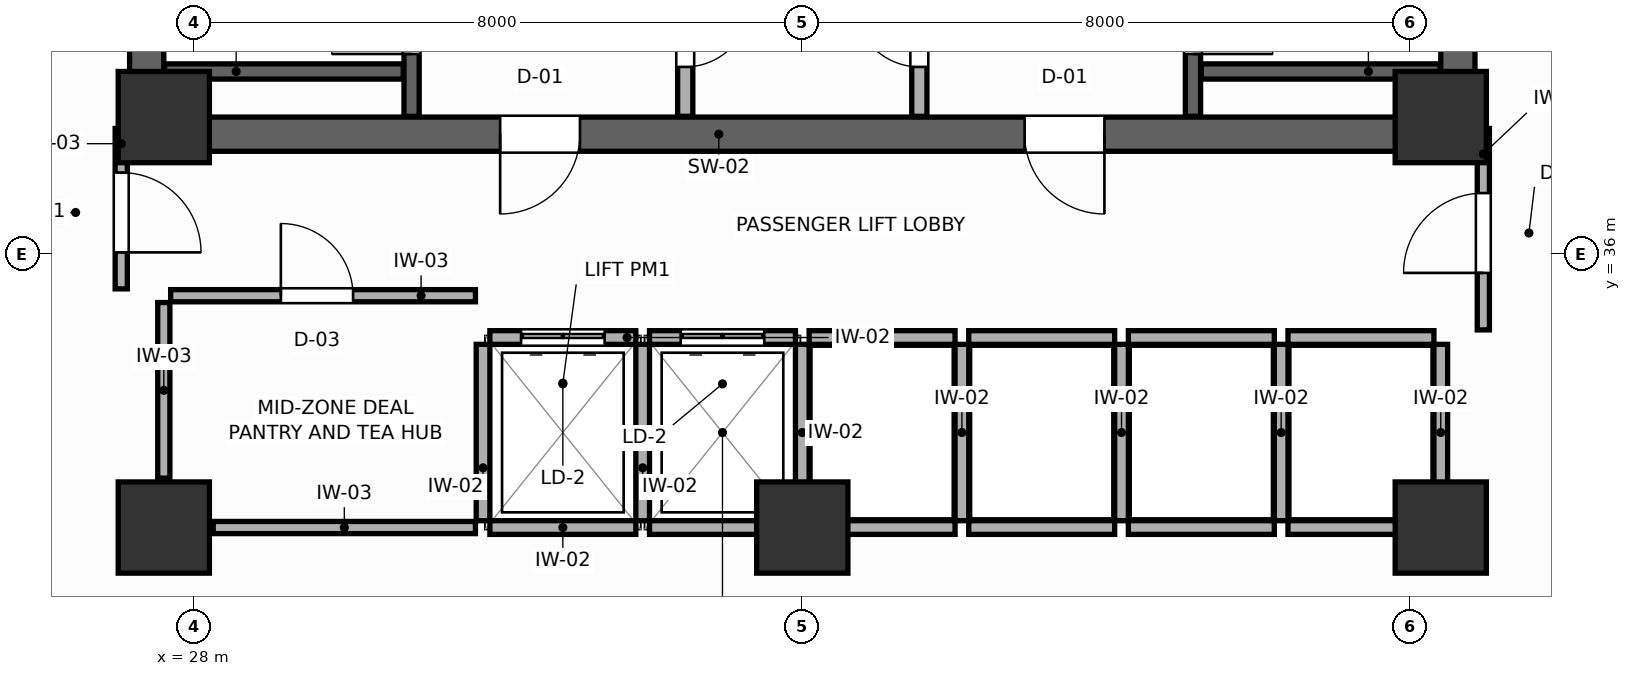
"""IFC4 building model, lengths in metres.
Left out: names, types, materials, properties, quantities, classifications, styles, units other than length and angle.
Written with IfcOpenShell. Run it as: python <this file> out.ifc"""

import sys

from ifc_helpers import new_model, si_unit, direction, frame, frame_2d, origin, origin_2d, place, context, subcontext, project, spatial, rectangle, extrude, source, transform, mapped, element, fill, save


model = new_model("IFC4")
c1 = context("Model", 3, precision=1e-05, world=origin(), true_north=direction((0.0, 1.0)))
c2 = subcontext(c1, "Body", "Model", "MODEL_VIEW")
j1 = project(units=[si_unit("LENGTHUNIT", "METRE"), si_unit("PLANEANGLEUNIT", "RADIAN")], contexts=[c1])
p1 = place(None, origin())
s1 = spatial("IfcSite", under=j1, at=p1, CompositionType="ELEMENT")
p2 = place(p1, origin())
s2 = spatial("IfcBuilding", under=s1, at=p2, CompositionType="ELEMENT")
p3 = place(p2, frame((0.0, 0.0, 124.2)))
s3 = spatial("IfcBuildingStorey", under=s2, at=p3, CompositionType="ELEMENT", Elevation=124.2)
p4 = place(p3, frame((27.15, 37.575, 0.0), z_axis=(0.0, 0.0, 1.0), x_axis=(1.0, 0.0, 0.0)))
e1 = element("IfcWall", 1, at=p4, inside=s3, PredefinedType="SHEAR", context=c2, shape_type="SweptSolid", body=[
    extrude(rectangle(XDim=17.7, YDim=0.45, at=frame_2d((8.85, 0.0))), origin(), (0.0, 0.0, 1.0), 3.6),
])
p5 = place(p4, frame((4.875, 0.0, 0.0)))
e2 = element("IfcOpeningElement", 2, at=p5, cuts=e1, PredefinedType="OPENING", context=c2, shape_type="SweptSolid", body=[
    extrude(rectangle(XDim=1.05, YDim=2.1, at=frame_2d((0.525, 1.05))), frame((0.0, 0.235, 0.0), z_axis=(0.0, -1.0, 0.0), x_axis=(1.0, 0.0, 0.0)), (0.0, 0.0, 1.0), 0.47),
])
p6 = place(p4, frame((11.775, 0.0, 0.0)))
e3 = element("IfcOpeningElement", 3, at=p6, cuts=e1, PredefinedType="OPENING", context=c2, shape_type="SweptSolid", body=[
    extrude(rectangle(XDim=1.05, YDim=2.1, at=frame_2d((0.525, 1.05))), frame((0.0, 0.235, 0.0), z_axis=(0.0, -1.0, 0.0), x_axis=(1.0, 0.0, 0.0)), (0.0, 0.0, 1.0), 0.47),
])
for number, where, z_axis, x_axis in (
    (4, (27.375, 37.8, 0.0), (0.0, 0.0, 1.0), (0.0, 1.0, 0.0)),
    (5, (44.625, 37.8, 0.0), (0.0, 0.0, 1.0), (0.0, 1.0, 0.0)),
):
    element("IfcWall", number, at=place(p3, frame(where, z_axis=z_axis, x_axis=x_axis)), inside=s3, PredefinedType="SHEAR", context=c2, shape_type="SweptSolid", body=[
        extrude(rectangle(XDim=9.0, YDim=0.45, at=frame_2d((4.5, 0.0))), origin(), (0.0, 0.0, 1.0), 3.6),
    ])
m1 = source(origin(), c2, "Body", "SweptSolid", [
    extrude(rectangle(XDim=1.2, YDim=1.2, at=origin_2d()), origin(), (0.0, 0.0, 1.0), 3.6),
])
for number, where, z_axis, x_axis in (
    (6, (27.6, 37.8, 0.0), (0.0, 0.0, 1.0), (1.0, 0.0, 0.0)),
    (7, (44.4, 37.8, 0.0), (0.0, 0.0, 1.0), (1.0, 0.0, 0.0)),
    (8, (27.6, 32.4, 0.0), (0.0, 0.0, 1.0), (1.0, 0.0, 0.0)),
    (9, (44.4, 32.4, 0.0), (0.0, 0.0, 1.0), (1.0, 0.0, 0.0)),
    (10, (36.0, 32.4, 0.0), (0.0, 0.0, 1.0), (1.0, 0.0, 0.0)),
):
    element("IfcColumn", number, at=place(p3, frame(where, z_axis=z_axis, x_axis=x_axis)), inside=s3, PredefinedType="COLUMN", context=c2, shape_type="MappedRepresentation", body=[
        mapped(m1, transform((0.0, 0.0, 0.0), scale=1.0)),
    ])
p7 = place(p3, frame((30.86, 37.81, 0.0), z_axis=(0.0, 0.0, 1.0), x_axis=(0.0, 1.0, 0.0)))
e11 = element("IfcWall", 11, at=p7, inside=s3, PredefinedType="SHEAR", context=c2, shape_type="SweptSolid", body=[
    extrude(rectangle(XDim=8.98, YDim=0.2, at=frame_2d((4.49, 0.0))), origin(), (0.0, 0.0, 1.0), 3.6),
])
p8 = place(p7, frame((0.82, 0.0, 0.0)))
e12 = element("IfcOpeningElement", 12, at=p8, cuts=e11, PredefinedType="OPENING", context=c2, shape_type="SweptSolid", body=[
    extrude(rectangle(XDim=1.05, YDim=2.1, at=frame_2d((0.525, 1.05))), frame((0.0, 0.11, 0.0), z_axis=(0.0, -1.0, 0.0), x_axis=(1.0, 0.0, 0.0)), (0.0, 0.0, 1.0), 0.22),
])
p9 = place(p3, frame((27.61, 38.4, 0.0), z_axis=(0.0, 0.0, 1.0), x_axis=(1.0, 0.0, 0.0)))
e13 = element("IfcWall", 13, at=p9, inside=s3, PredefinedType="SHEAR", context=c2, shape_type="SweptSolid", body=[
    extrude(rectangle(XDim=3.14, YDim=0.2, at=frame_2d((1.57, 0.0))), origin(), (0.0, 0.0, 1.0), 3.6),
])
p10 = place(p3, frame((41.14, 37.81, 0.0), z_axis=(0.0, 0.0, 1.0), x_axis=(0.0, 1.0, 0.0)))
e14 = element("IfcWall", 14, at=p10, inside=s3, PredefinedType="SHEAR", context=c2, shape_type="SweptSolid", body=[
    extrude(rectangle(XDim=8.98, YDim=0.2, at=frame_2d((4.49, 0.0))), origin(), (0.0, 0.0, 1.0), 3.6),
])
p11 = place(p10, frame((0.82, 0.0, 0.0)))
e15 = element("IfcOpeningElement", 15, at=p11, cuts=e14, PredefinedType="OPENING", context=c2, shape_type="SweptSolid", body=[
    extrude(rectangle(XDim=1.05, YDim=2.1, at=frame_2d((0.525, 1.05))), frame((0.0, 0.11, 0.0), z_axis=(0.0, -1.0, 0.0), x_axis=(1.0, 0.0, 0.0)), (0.0, 0.0, 1.0), 0.22),
])
p12 = place(p3, frame((41.25, 38.4, 0.0), z_axis=(0.0, 0.0, 1.0), x_axis=(1.0, 0.0, 0.0)))
e16 = element("IfcWall", 16, at=p12, inside=s3, PredefinedType="SHEAR", context=c2, shape_type="SweptSolid", body=[
    extrude(rectangle(XDim=3.14, YDim=0.2, at=frame_2d((1.57, 0.0))), origin(), (0.0, 0.0, 1.0), 3.6),
])
p13 = place(p3, frame((34.46, 37.81, 0.0), z_axis=(0.0, 0.0, 1.0), x_axis=(0.0, 1.0, 0.0)))
e17 = element("IfcWall", 17, at=p13, inside=s3, PredefinedType="PARTITIONING", context=c2, shape_type="SweptSolid", body=[
    extrude(rectangle(XDim=8.98, YDim=0.2, at=frame_2d((4.49, 0.0))), origin(), (0.0, 0.0, 1.0), 3.4),
])
p14 = place(p13, frame((0.65, 0.0, 0.0)))
e18 = element("IfcOpeningElement", 18, at=p14, cuts=e17, PredefinedType="OPENING", context=c2, shape_type="SweptSolid", body=[
    extrude(rectangle(XDim=0.85, YDim=2.05, at=frame_2d((0.425, 1.025))), frame((0.0, 0.11, 0.0), z_axis=(0.0, -1.0, 0.0), x_axis=(1.0, 0.0, 0.0)), (0.0, 0.0, 1.0), 0.22),
])
p15 = place(p3, frame((37.54, 37.81, 0.0), z_axis=(0.0, 0.0, 1.0), x_axis=(0.0, 1.0, 0.0)))
e19 = element("IfcWall", 19, at=p15, inside=s3, PredefinedType="PARTITIONING", context=c2, shape_type="SweptSolid", body=[
    extrude(rectangle(XDim=8.98, YDim=0.2, at=frame_2d((4.49, 0.0))), origin(), (0.0, 0.0, 1.0), 3.4),
])
p16 = place(p15, frame((0.65, 0.0, 0.0)))
e20 = element("IfcOpeningElement", 20, at=p16, cuts=e19, PredefinedType="OPENING", context=c2, shape_type="SweptSolid", body=[
    extrude(rectangle(XDim=0.85, YDim=2.05, at=frame_2d((0.425, 1.025))), frame((0.0, 0.11, 0.0), z_axis=(0.0, -1.0, 0.0), x_axis=(1.0, 0.0, 0.0)), (0.0, 0.0, 1.0), 0.22),
])
p17 = place(p3, frame((31.89, 34.9, 0.0), z_axis=(0.0, 0.0, 1.0), x_axis=(1.0, 0.0, 0.0)))
e21 = element("IfcWall", 21, at=p17, inside=s3, PredefinedType="PARTITIONING", context=c2, shape_type="SweptSolid", body=[
    extrude(rectangle(XDim=1.92, YDim=0.18, at=frame_2d((0.96, 0.0))), origin(), (0.0, 0.0, 1.0), 3.4),
])
p18 = place(p17, frame((0.41, 0.0, 0.0)))
e22 = element("IfcOpeningElement", 22, at=p18, cuts=e21, PredefinedType="OPENING", context=c2, shape_type="SweptSolid", body=[
    extrude(rectangle(XDim=1.1, YDim=2.1, at=frame_2d((0.55, 1.05))), frame((0.0, 0.1, 0.0), z_axis=(0.0, -1.0, 0.0), x_axis=(1.0, 0.0, 0.0)), (0.0, 0.0, 1.0), 0.2),
])
p19 = place(p3, frame((31.89, 32.4, 0.0), z_axis=(0.0, 0.0, 1.0), x_axis=(1.0, 0.0, 0.0)))
e23 = element("IfcWall", 23, at=p19, inside=s3, PredefinedType="PARTITIONING", context=c2, shape_type="SweptSolid", body=[
    extrude(rectangle(XDim=1.92, YDim=0.18, at=frame_2d((0.96, 0.0))), origin(), (0.0, 0.0, 1.0), 2.95),
])
p20 = place(p3, frame((31.8, 32.49, 0.0), z_axis=(0.0, 0.0, 1.0), x_axis=(0.0, 1.0, 0.0)))
e24 = element("IfcWall", 24, at=p20, inside=s3, PredefinedType="PARTITIONING", context=c2, shape_type="SweptSolid", body=[
    extrude(rectangle(XDim=2.32, YDim=0.18, at=frame_2d((1.16, 0.0))), origin(), (0.0, 0.0, 1.0), 3.4),
])
p21 = place(p3, frame((33.99, 34.9, 0.0), z_axis=(0.0, 0.0, 1.0), x_axis=(1.0, 0.0, 0.0)))
e25 = element("IfcWall", 25, at=p21, inside=s3, PredefinedType="PARTITIONING", context=c2, shape_type="SweptSolid", body=[
    extrude(rectangle(XDim=1.92, YDim=0.18, at=frame_2d((0.96, 0.0))), origin(), (0.0, 0.0, 1.0), 3.4),
])
p22 = place(p21, frame((0.41, 0.0, 0.0)))
e26 = element("IfcOpeningElement", 26, at=p22, cuts=e25, PredefinedType="OPENING", context=c2, shape_type="SweptSolid", body=[
    extrude(rectangle(XDim=1.1, YDim=2.1, at=frame_2d((0.55, 1.05))), frame((0.0, 0.1, 0.0), z_axis=(0.0, -1.0, 0.0), x_axis=(1.0, 0.0, 0.0)), (0.0, 0.0, 1.0), 0.2),
])
p23 = place(p3, frame((33.99, 32.4, 0.0), z_axis=(0.0, 0.0, 1.0), x_axis=(1.0, 0.0, 0.0)))
e27 = element("IfcWall", 27, at=p23, inside=s3, PredefinedType="PARTITIONING", context=c2, shape_type="SweptSolid", body=[
    extrude(rectangle(XDim=1.92, YDim=0.18, at=frame_2d((0.96, 0.0))), origin(), (0.0, 0.0, 1.0), 2.95),
])
p24 = place(p3, frame((33.9, 32.49, 0.0), z_axis=(0.0, 0.0, 1.0), x_axis=(0.0, 1.0, 0.0)))
e28 = element("IfcWall", 28, at=p24, inside=s3, PredefinedType="PARTITIONING", context=c2, shape_type="SweptSolid", body=[
    extrude(rectangle(XDim=2.32, YDim=0.18, at=frame_2d((1.16, 0.0))), origin(), (0.0, 0.0, 1.0), 3.4),
])
p25 = place(p3, frame((36.09, 34.9, 0.0), z_axis=(0.0, 0.0, 1.0), x_axis=(1.0, 0.0, 0.0)))
e29 = element("IfcWall", 29, at=p25, inside=s3, PredefinedType="PARTITIONING", context=c2, shape_type="SweptSolid", body=[
    extrude(rectangle(XDim=1.92, YDim=0.18, at=frame_2d((0.96, 0.0))), origin(), (0.0, 0.0, 1.0), 3.4),
])
p26 = place(p3, frame((36.09, 32.4, 0.0), z_axis=(0.0, 0.0, 1.0), x_axis=(1.0, 0.0, 0.0)))
e30 = element("IfcWall", 30, at=p26, inside=s3, PredefinedType="PARTITIONING", context=c2, shape_type="SweptSolid", body=[
    extrude(rectangle(XDim=1.92, YDim=0.18, at=frame_2d((0.96, 0.0))), origin(), (0.0, 0.0, 1.0), 2.95),
])
p27 = place(p3, frame((36.0, 32.49, 0.0), z_axis=(0.0, 0.0, 1.0), x_axis=(0.0, 1.0, 0.0)))
e31 = element("IfcWall", 31, at=p27, inside=s3, PredefinedType="PARTITIONING", context=c2, shape_type="SweptSolid", body=[
    extrude(rectangle(XDim=2.32, YDim=0.18, at=frame_2d((1.16, 0.0))), origin(), (0.0, 0.0, 1.0), 3.4),
])
p28 = place(p3, frame((38.19, 34.9, 0.0), z_axis=(0.0, 0.0, 1.0), x_axis=(1.0, 0.0, 0.0)))
e32 = element("IfcWall", 32, at=p28, inside=s3, PredefinedType="PARTITIONING", context=c2, shape_type="SweptSolid", body=[
    extrude(rectangle(XDim=1.92, YDim=0.18, at=frame_2d((0.96, 0.0))), origin(), (0.0, 0.0, 1.0), 3.4),
])
p29 = place(p3, frame((38.19, 32.4, 0.0), z_axis=(0.0, 0.0, 1.0), x_axis=(1.0, 0.0, 0.0)))
e33 = element("IfcWall", 33, at=p29, inside=s3, PredefinedType="PARTITIONING", context=c2, shape_type="SweptSolid", body=[
    extrude(rectangle(XDim=1.92, YDim=0.18, at=frame_2d((0.96, 0.0))), origin(), (0.0, 0.0, 1.0), 2.95),
])
p30 = place(p3, frame((38.1, 32.49, 0.0), z_axis=(0.0, 0.0, 1.0), x_axis=(0.0, 1.0, 0.0)))
e34 = element("IfcWall", 34, at=p30, inside=s3, PredefinedType="PARTITIONING", context=c2, shape_type="SweptSolid", body=[
    extrude(rectangle(XDim=2.32, YDim=0.18, at=frame_2d((1.16, 0.0))), origin(), (0.0, 0.0, 1.0), 3.4),
])
p31 = place(p3, frame((40.29, 34.9, 0.0), z_axis=(0.0, 0.0, 1.0), x_axis=(1.0, 0.0, 0.0)))
e35 = element("IfcWall", 35, at=p31, inside=s3, PredefinedType="PARTITIONING", context=c2, shape_type="SweptSolid", body=[
    extrude(rectangle(XDim=1.92, YDim=0.18, at=frame_2d((0.96, 0.0))), origin(), (0.0, 0.0, 1.0), 3.4),
])
p32 = place(p3, frame((40.29, 32.4, 0.0), z_axis=(0.0, 0.0, 1.0), x_axis=(1.0, 0.0, 0.0)))
e36 = element("IfcWall", 36, at=p32, inside=s3, PredefinedType="PARTITIONING", context=c2, shape_type="SweptSolid", body=[
    extrude(rectangle(XDim=1.92, YDim=0.18, at=frame_2d((0.96, 0.0))), origin(), (0.0, 0.0, 1.0), 2.95),
])
p33 = place(p3, frame((40.2, 32.49, 0.0), z_axis=(0.0, 0.0, 1.0), x_axis=(0.0, 1.0, 0.0)))
e37 = element("IfcWall", 37, at=p33, inside=s3, PredefinedType="PARTITIONING", context=c2, shape_type="SweptSolid", body=[
    extrude(rectangle(XDim=2.32, YDim=0.18, at=frame_2d((1.16, 0.0))), origin(), (0.0, 0.0, 1.0), 3.4),
])
p34 = place(p3, frame((42.39, 34.9, 0.0), z_axis=(0.0, 0.0, 1.0), x_axis=(1.0, 0.0, 0.0)))
e38 = element("IfcWall", 38, at=p34, inside=s3, PredefinedType="PARTITIONING", context=c2, shape_type="SweptSolid", body=[
    extrude(rectangle(XDim=1.92, YDim=0.18, at=frame_2d((0.96, 0.0))), origin(), (0.0, 0.0, 1.0), 3.4),
])
p35 = place(p3, frame((42.39, 32.4, 0.0), z_axis=(0.0, 0.0, 1.0), x_axis=(1.0, 0.0, 0.0)))
e39 = element("IfcWall", 39, at=p35, inside=s3, PredefinedType="PARTITIONING", context=c2, shape_type="SweptSolid", body=[
    extrude(rectangle(XDim=1.92, YDim=0.18, at=frame_2d((0.96, 0.0))), origin(), (0.0, 0.0, 1.0), 2.95),
])
for number, where, z_axis, x_axis in (
    (40, (42.3, 32.49, 0.0), (0.0, 0.0, 1.0), (0.0, 1.0, 0.0)),
    (41, (44.4, 32.49, 0.0), (0.0, 0.0, 1.0), (0.0, 1.0, 0.0)),
):
    element("IfcWall", number, at=place(p3, frame(where, z_axis=z_axis, x_axis=x_axis)), inside=s3, PredefinedType="PARTITIONING", context=c2, shape_type="SweptSolid", body=[
        extrude(rectangle(XDim=2.32, YDim=0.18, at=frame_2d((1.16, 0.0))), origin(), (0.0, 0.0, 1.0), 3.4),
    ])
p36 = place(p3, frame((28.25, 32.4, 0.0), z_axis=(0.0, 0.0, 1.0), x_axis=(1.0, 0.0, 0.0)))
e42 = element("IfcWall", 42, at=p36, inside=s3, PredefinedType="PARTITIONING", context=c2, shape_type="SweptSolid", body=[
    extrude(rectangle(XDim=3.45, YDim=0.16, at=frame_2d((1.725, 0.0))), origin(), (0.0, 0.0, 1.0), 2.95),
])
p37 = place(p3, frame((27.6, 33.05, 0.0), z_axis=(0.0, 0.0, 1.0), x_axis=(0.0, 1.0, 0.0)))
e43 = element("IfcWall", 43, at=p37, inside=s3, PredefinedType="PARTITIONING", context=c2, shape_type="SweptSolid", body=[
    extrude(rectangle(XDim=2.31, YDim=0.16, at=frame_2d((1.155, 0.0))), origin(), (0.0, 0.0, 1.0), 3.4),
])
p38 = place(p3, frame((27.69, 35.45, 0.0), z_axis=(0.0, 0.0, 1.0), x_axis=(1.0, 0.0, 0.0)))
e44 = element("IfcWall", 44, at=p38, inside=s3, PredefinedType="PARTITIONING", context=c2, shape_type="SweptSolid", body=[
    extrude(rectangle(XDim=4.01, YDim=0.16, at=frame_2d((2.005, 0.0))), origin(), (0.0, 0.0, 1.0), 3.4),
])
p39 = place(p38, frame((1.45, 0.0, 0.0)))
e45 = element("IfcOpeningElement", 45, at=p39, cuts=e44, PredefinedType="OPENING", context=c2, shape_type="SweptSolid", body=[
    extrude(rectangle(XDim=0.95, YDim=2.05, at=frame_2d((0.475, 1.025))), frame((0.0, 0.09, 0.0), z_axis=(0.0, -1.0, 0.0), x_axis=(1.0, 0.0, 0.0)), (0.0, 0.0, 1.0), 0.18),
])
p40 = place(p3, frame((27.04, 35.54, 0.0), z_axis=(0.0, 0.0, 1.0), x_axis=(0.0, 1.0, 0.0)))
e46 = element("IfcWall", 46, at=p40, inside=s3, PredefinedType="PARTITIONING", context=c2, shape_type="SweptSolid", body=[
    extrude(rectangle(XDim=2.11, YDim=0.16, at=frame_2d((1.055, 0.0))), origin(), (0.0, 0.0, 1.0), 3.4),
])
p41 = place(p40, frame((0.48, 0.0, 0.0)))
e47 = element("IfcOpeningElement", 47, at=p41, cuts=e46, PredefinedType="OPENING", context=c2, shape_type="SweptSolid", body=[
    extrude(rectangle(XDim=1.05, YDim=2.1, at=frame_2d((0.525, 1.05))), frame((0.0, 0.09, 0.0), z_axis=(0.0, -1.0, 0.0), x_axis=(1.0, 0.0, 0.0)), (0.0, 0.0, 1.0), 0.18),
])
p42 = place(p3, frame((44.96, 35.0, 0.0), z_axis=(0.0, 0.0, 1.0), x_axis=(0.0, 1.0, 0.0)))
e48 = element("IfcWall", 48, at=p42, inside=s3, PredefinedType="PARTITIONING", context=c2, shape_type="SweptSolid", body=[
    extrude(rectangle(XDim=2.65, YDim=0.16, at=frame_2d((1.325, 0.0))), origin(), (0.0, 0.0, 1.0), 3.4),
])
p43 = place(p42, frame((0.75, 0.0, 0.0)))
e49 = element("IfcOpeningElement", 49, at=p43, cuts=e48, PredefinedType="OPENING", context=c2, shape_type="SweptSolid", body=[
    extrude(rectangle(XDim=1.05, YDim=2.1, at=frame_2d((0.525, 1.05))), frame((0.0, 0.09, 0.0), z_axis=(0.0, -1.0, 0.0), x_axis=(1.0, 0.0, 0.0)), (0.0, 0.0, 1.0), 0.18),
])
p44 = place(p8, origin())
e50 = element("IfcDoor", 50, at=p44, inside=s3, OperationType="SINGLE_SWING_LEFT", PredefinedType="DOOR", context=c2, shape_type="SweptSolid", body=[
    extrude(rectangle(XDim=1.05, YDim=2.1, at=frame_2d((0.525, 1.05))), frame((0.0, 0.025, 0.0), z_axis=(0.0, -1.0, 0.0), x_axis=(1.0, 0.0, 0.0)), (0.0, 0.0, 1.0), 0.05),
])
fill(e12, e50)
p45 = place(p11, frame((1.05, 0.0, 0.0), z_axis=(0.0, 0.0, 1.0), x_axis=(-1.0, 0.0, 0.0)))
e51 = element("IfcDoor", 51, at=p45, inside=s3, OperationType="SINGLE_SWING_RIGHT", PredefinedType="DOOR", context=c2, shape_type="SweptSolid", body=[
    extrude(rectangle(XDim=1.05, YDim=2.1, at=frame_2d((0.525, 1.05))), frame((0.0, 0.025, 0.0), z_axis=(0.0, -1.0, 0.0), x_axis=(1.0, 0.0, 0.0)), (0.0, 0.0, 1.0), 0.05),
])
fill(e15, e51)
p46 = place(p14, frame((0.85, 0.0, 0.0), z_axis=(0.0, 0.0, 1.0), x_axis=(-1.0, 0.0, 0.0)))
e52 = element("IfcDoor", 52, at=p46, inside=s3, OperationType="SINGLE_SWING_LEFT", PredefinedType="DOOR", context=c2, shape_type="SweptSolid", body=[
    extrude(rectangle(XDim=0.85, YDim=2.05, at=frame_2d((0.425, 1.025))), frame((0.0, 0.025, 0.0), z_axis=(0.0, -1.0, 0.0), x_axis=(1.0, 0.0, 0.0)), (0.0, 0.0, 1.0), 0.05),
])
fill(e18, e52)
p47 = place(p16, origin())
e53 = element("IfcDoor", 53, at=p47, inside=s3, OperationType="SINGLE_SWING_RIGHT", PredefinedType="DOOR", context=c2, shape_type="SweptSolid", body=[
    extrude(rectangle(XDim=0.85, YDim=2.05, at=frame_2d((0.425, 1.025))), frame((0.0, 0.025, 0.0), z_axis=(0.0, -1.0, 0.0), x_axis=(1.0, 0.0, 0.0)), (0.0, 0.0, 1.0), 0.05),
])
fill(e20, e53)
p48 = place(p18, origin())
e54 = element("IfcDoor", 54, at=p48, inside=s3, OperationType="DOUBLE_DOOR_SLIDING", PredefinedType="DOOR", context=c2, shape_type="SweptSolid", body=[
    extrude(rectangle(XDim=1.1, YDim=2.1, at=frame_2d((0.55, 1.05))), frame((0.0, 0.025, 0.0), z_axis=(0.0, -1.0, 0.0), x_axis=(1.0, 0.0, 0.0)), (0.0, 0.0, 1.0), 0.05),
])
fill(e22, e54)
p49 = place(p22, origin())
e55 = element("IfcDoor", 55, at=p49, inside=s3, OperationType="DOUBLE_DOOR_SLIDING", PredefinedType="DOOR", context=c2, shape_type="SweptSolid", body=[
    extrude(rectangle(XDim=1.1, YDim=2.1, at=frame_2d((0.55, 1.05))), frame((0.0, 0.025, 0.0), z_axis=(0.0, -1.0, 0.0), x_axis=(1.0, 0.0, 0.0)), (0.0, 0.0, 1.0), 0.05),
])
fill(e26, e55)
p50 = place(p39, origin())
e56 = element("IfcDoor", 56, at=p50, inside=s3, OperationType="SINGLE_SWING_LEFT", PredefinedType="DOOR", context=c2, shape_type="SweptSolid", body=[
    extrude(rectangle(XDim=0.95, YDim=2.05, at=frame_2d((0.475, 1.025))), frame((0.0, 0.025, 0.0), z_axis=(0.0, -1.0, 0.0), x_axis=(1.0, 0.0, 0.0)), (0.0, 0.0, 1.0), 0.05),
])
fill(e45, e56)
p51 = place(p41, frame((1.05, 0.0, 0.0), z_axis=(0.0, 0.0, 1.0), x_axis=(-1.0, 0.0, 0.0)))
e57 = element("IfcDoor", 57, at=p51, inside=s3, OperationType="SINGLE_SWING_RIGHT", PredefinedType="DOOR", context=c2, shape_type="SweptSolid", body=[
    extrude(rectangle(XDim=1.05, YDim=2.1, at=frame_2d((0.525, 1.05))), frame((0.0, 0.025, 0.0), z_axis=(0.0, -1.0, 0.0), x_axis=(1.0, 0.0, 0.0)), (0.0, 0.0, 1.0), 0.05),
])
fill(e47, e57)
p52 = place(p43, origin())
e58 = element("IfcDoor", 58, at=p52, inside=s3, OperationType="SINGLE_SWING_LEFT", PredefinedType="DOOR", context=c2, shape_type="SweptSolid", body=[
    extrude(rectangle(XDim=1.05, YDim=2.1, at=frame_2d((0.525, 1.05))), frame((0.0, 0.025, 0.0), z_axis=(0.0, -1.0, 0.0), x_axis=(1.0, 0.0, 0.0)), (0.0, 0.0, 1.0), 0.05),
])
fill(e49, e58)
p53 = place(p5, frame((1.05, 0.0, 0.0), z_axis=(0.0, 0.0, 1.0), x_axis=(-1.0, 0.0, 0.0)))
e59 = element("IfcDoor", 59, at=p53, inside=s3, OperationType="SINGLE_SWING_RIGHT", PredefinedType="DOOR", context=c2, shape_type="SweptSolid", body=[
    extrude(rectangle(XDim=1.05, YDim=2.1, at=frame_2d((0.525, 1.05))), frame((0.0, 0.025, 0.0), z_axis=(0.0, -1.0, 0.0), x_axis=(1.0, 0.0, 0.0)), (0.0, 0.0, 1.0), 0.05),
])
fill(e2, e59)
p54 = place(p6, frame((1.05, 0.0, 0.0), z_axis=(0.0, 0.0, 1.0), x_axis=(-1.0, 0.0, 0.0)))
e60 = element("IfcDoor", 60, at=p54, inside=s3, OperationType="SINGLE_SWING_LEFT", PredefinedType="DOOR", context=c2, shape_type="SweptSolid", body=[
    extrude(rectangle(XDim=1.05, YDim=2.1, at=frame_2d((0.525, 1.05))), frame((0.0, 0.025, 0.0), z_axis=(0.0, -1.0, 0.0), x_axis=(1.0, 0.0, 0.0)), (0.0, 0.0, 1.0), 0.05),
])
fill(e3, e60)
save(model, sys.argv[1])
